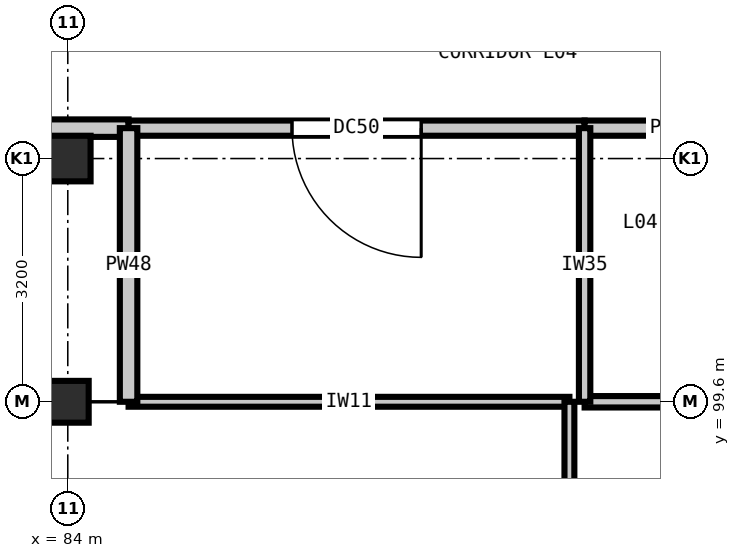
"""IFC4 building model, lengths in metres.
Left out: names, types, materials, properties, quantities, classifications, styles, units other than length and angle.
Written with IfcOpenShell. Run it as: python <this file> out.ifc"""

import sys

from ifc_helpers import new_model, si_unit, direction, frame, frame_2d, origin, origin_2d, place, context, subcontext, project, spatial, rectangle, extrude, element, fill, save


model = new_model("IFC4")
c1 = context("Model", 3, precision=1e-05, world=origin(), true_north=direction((0.0, 1.0)))
c2 = subcontext(c1, "Body", "Model", "MODEL_VIEW")
j1 = project(units=[si_unit("LENGTHUNIT", "METRE"), si_unit("PLANEANGLEUNIT", "RADIAN")], contexts=[c1])
p1 = place(None, origin())
s1 = spatial("IfcSite", under=j1, at=p1, CompositionType="ELEMENT")
p2 = place(p1, origin())
s2 = spatial("IfcBuilding", under=s1, at=p2, CompositionType="ELEMENT")
p3 = place(p2, frame((0.0, 0.0, 20.4)))
s3 = spatial("IfcBuildingStorey", under=s2, at=p3, CompositionType="ELEMENT", Elevation=20.4)
p4 = place(p3, frame((84.0, 99.6, 0.0), z_axis=(0.0, 0.0, 1.0), x_axis=(1.0, 0.0, 0.0)))
e1 = element("IfcColumn", 1, at=p4, inside=s3, PredefinedType="COLUMN", context=c2, shape_type="SweptSolid", body=[
    extrude(rectangle(XDim=0.55, YDim=0.55, at=origin_2d()), origin(), (0.0, 0.0, 1.0), 4.2),
])
p5 = place(p3, frame((84.0, 102.8, 0.0), z_axis=(0.0, 0.0, 1.0), x_axis=(1.0, 0.0, 0.0)))
e2 = element("IfcColumn", 2, at=p5, inside=s3, PredefinedType="COLUMN", context=c2, shape_type="SweptSolid", body=[
    extrude(rectangle(XDim=0.6, YDim=0.6, at=origin_2d()), origin(), (0.0, 0.0, 1.0), 4.2),
])
p6 = place(p3, frame((84.8, 99.6, 0.0), z_axis=(0.0, 0.0, 1.0), x_axis=(1.0, 0.0, 0.0)))
e3 = element("IfcWall", 3, at=p6, inside=s3, PredefinedType="PARTITIONING", context=c2, shape_type="SweptSolid", body=[
    extrude(rectangle(XDim=5.8, YDim=0.13, at=frame_2d((2.9, 0.0))), origin(), (0.0, 0.0, 1.0), 3.585),
])
p7 = place(p3, frame((90.8, 99.6, 0.0), z_axis=(0.0, 0.0, 1.0), x_axis=(1.0, 0.0, 0.0)))
e4 = element("IfcWall", 4, at=p7, inside=s3, PredefinedType="PARTITIONING", context=c2, shape_type="SweptSolid", body=[
    extrude(rectangle(XDim=1.432, YDim=0.15, at=frame_2d((0.716, 0.0))), origin(), (0.0, 0.0, 1.0), 3.585),
])
p8 = place(p3, frame((79.8, 103.2, 0.0), z_axis=(0.0, 0.0, 1.0), x_axis=(1.0, 0.0, 0.0)))
e5 = element("IfcWall", 5, at=p8, inside=s3, PredefinedType="PARTITIONING", context=c2, shape_type="SweptSolid", body=[
    extrude(rectangle(XDim=5.0, YDim=0.23, at=frame_2d((2.5, 0.0))), origin(), (0.0, 0.0, 1.0), 3.82),
])
p9 = place(p8, frame((1.725, 0.0, 0.0)))
e6 = element("IfcOpeningElement", 6, at=p9, cuts=e5, PredefinedType="OPENING", context=c2, shape_type="SweptSolid", body=[
    extrude(rectangle(XDim=1.55, YDim=2.25, at=frame_2d((0.775, 1.125))), frame((0.0, 0.125, 0.0), z_axis=(0.0, -1.0, 0.0), x_axis=(1.0, 0.0, 0.0)), (0.0, 0.0, 1.0), 0.25),
])
p10 = place(p3, frame((84.8, 103.2, 0.0), z_axis=(0.0, 0.0, 1.0), x_axis=(1.0, 0.0, 0.0)))
e7 = element("IfcWall", 7, at=p10, inside=s3, PredefinedType="PARTITIONING", context=c2, shape_type="SweptSolid", body=[
    extrude(rectangle(XDim=6.0, YDim=0.2, at=frame_2d((3.0, 0.0))), origin(), (0.0, 0.0, 1.0), 3.82),
])
p11 = place(p10, frame((2.15, 0.0, 0.0)))
e8 = element("IfcOpeningElement", 8, at=p11, cuts=e7, PredefinedType="OPENING", context=c2, shape_type="SweptSolid", body=[
    extrude(rectangle(XDim=1.7, YDim=2.3, at=frame_2d((0.85, 1.15))), frame((0.0, 0.11, 0.0), z_axis=(0.0, -1.0, 0.0), x_axis=(1.0, 0.0, 0.0)), (0.0, 0.0, 1.0), 0.22),
])
p12 = place(p3, frame((90.8, 103.2, 0.0), z_axis=(0.0, 0.0, 1.0), x_axis=(1.0, 0.0, 0.0)))
e9 = element("IfcWall", 9, at=p12, inside=s3, PredefinedType="PARTITIONING", context=c2, shape_type="SweptSolid", body=[
    extrude(rectangle(XDim=7.0, YDim=0.2, at=frame_2d((3.5, 0.0))), origin(), (0.0, 0.0, 1.0), 3.82),
])
p13 = place(p12, frame((2.575, 0.0, 0.0)))
e10 = element("IfcOpeningElement", 10, at=p13, cuts=e9, PredefinedType="OPENING", context=c2, shape_type="SweptSolid", body=[
    extrude(rectangle(XDim=1.85, YDim=2.3, at=frame_2d((0.925, 1.15))), frame((0.0, 0.11, 0.0), z_axis=(0.0, -1.0, 0.0), x_axis=(1.0, 0.0, 0.0)), (0.0, 0.0, 1.0), 0.22),
])
p14 = place(p3, frame((84.8, 99.6, 0.0), z_axis=(0.0, 0.0, 1.0), x_axis=(0.0, 1.0, 0.0)))
e11 = element("IfcWall", 11, at=p14, inside=s3, PredefinedType="PARTITIONING", context=c2, shape_type="SweptSolid", body=[
    extrude(rectangle(XDim=3.6, YDim=0.23, at=frame_2d((1.8, 0.0))), origin(), (0.0, 0.0, 1.0), 3.82),
])
p15 = place(p3, frame((90.6, 88.6, 0.0), z_axis=(0.0, 0.0, 1.0), x_axis=(0.0, 1.0, 0.0)))
e12 = element("IfcWall", 12, at=p15, inside=s3, PredefinedType="PARTITIONING", context=c2, shape_type="SweptSolid", body=[
    extrude(rectangle(XDim=11.0, YDim=0.13, at=frame_2d((5.5, 0.0))), origin(), (0.0, 0.0, 1.0), 3.82),
])
p16 = place(p3, frame((90.8, 99.6, 0.0), z_axis=(0.0, 0.0, 1.0), x_axis=(0.0, 1.0, 0.0)))
e13 = element("IfcWall", 13, at=p16, inside=s3, PredefinedType="PARTITIONING", context=c2, shape_type="SweptSolid", body=[
    extrude(rectangle(XDim=3.6, YDim=0.15, at=frame_2d((1.8, 0.0))), origin(), (0.0, 0.0, 1.0), 3.82),
])
p17 = place(p11, frame((1.7, 0.0, 0.0), z_axis=(0.0, 0.0, 1.0), x_axis=(-1.0, 0.0, 0.0)))
e14 = element("IfcDoor", 14, at=p17, inside=s3, OperationType="SINGLE_SWING_LEFT", PredefinedType="DOOR", context=c2, shape_type="SweptSolid", body=[
    extrude(rectangle(XDim=1.7, YDim=2.3, at=frame_2d((0.85, 1.15))), frame((0.0, 0.025, 0.0), z_axis=(0.0, -1.0, 0.0), x_axis=(1.0, 0.0, 0.0)), (0.0, 0.0, 1.0), 0.05),
])
fill(e8, e14)
save(model, sys.argv[1])
